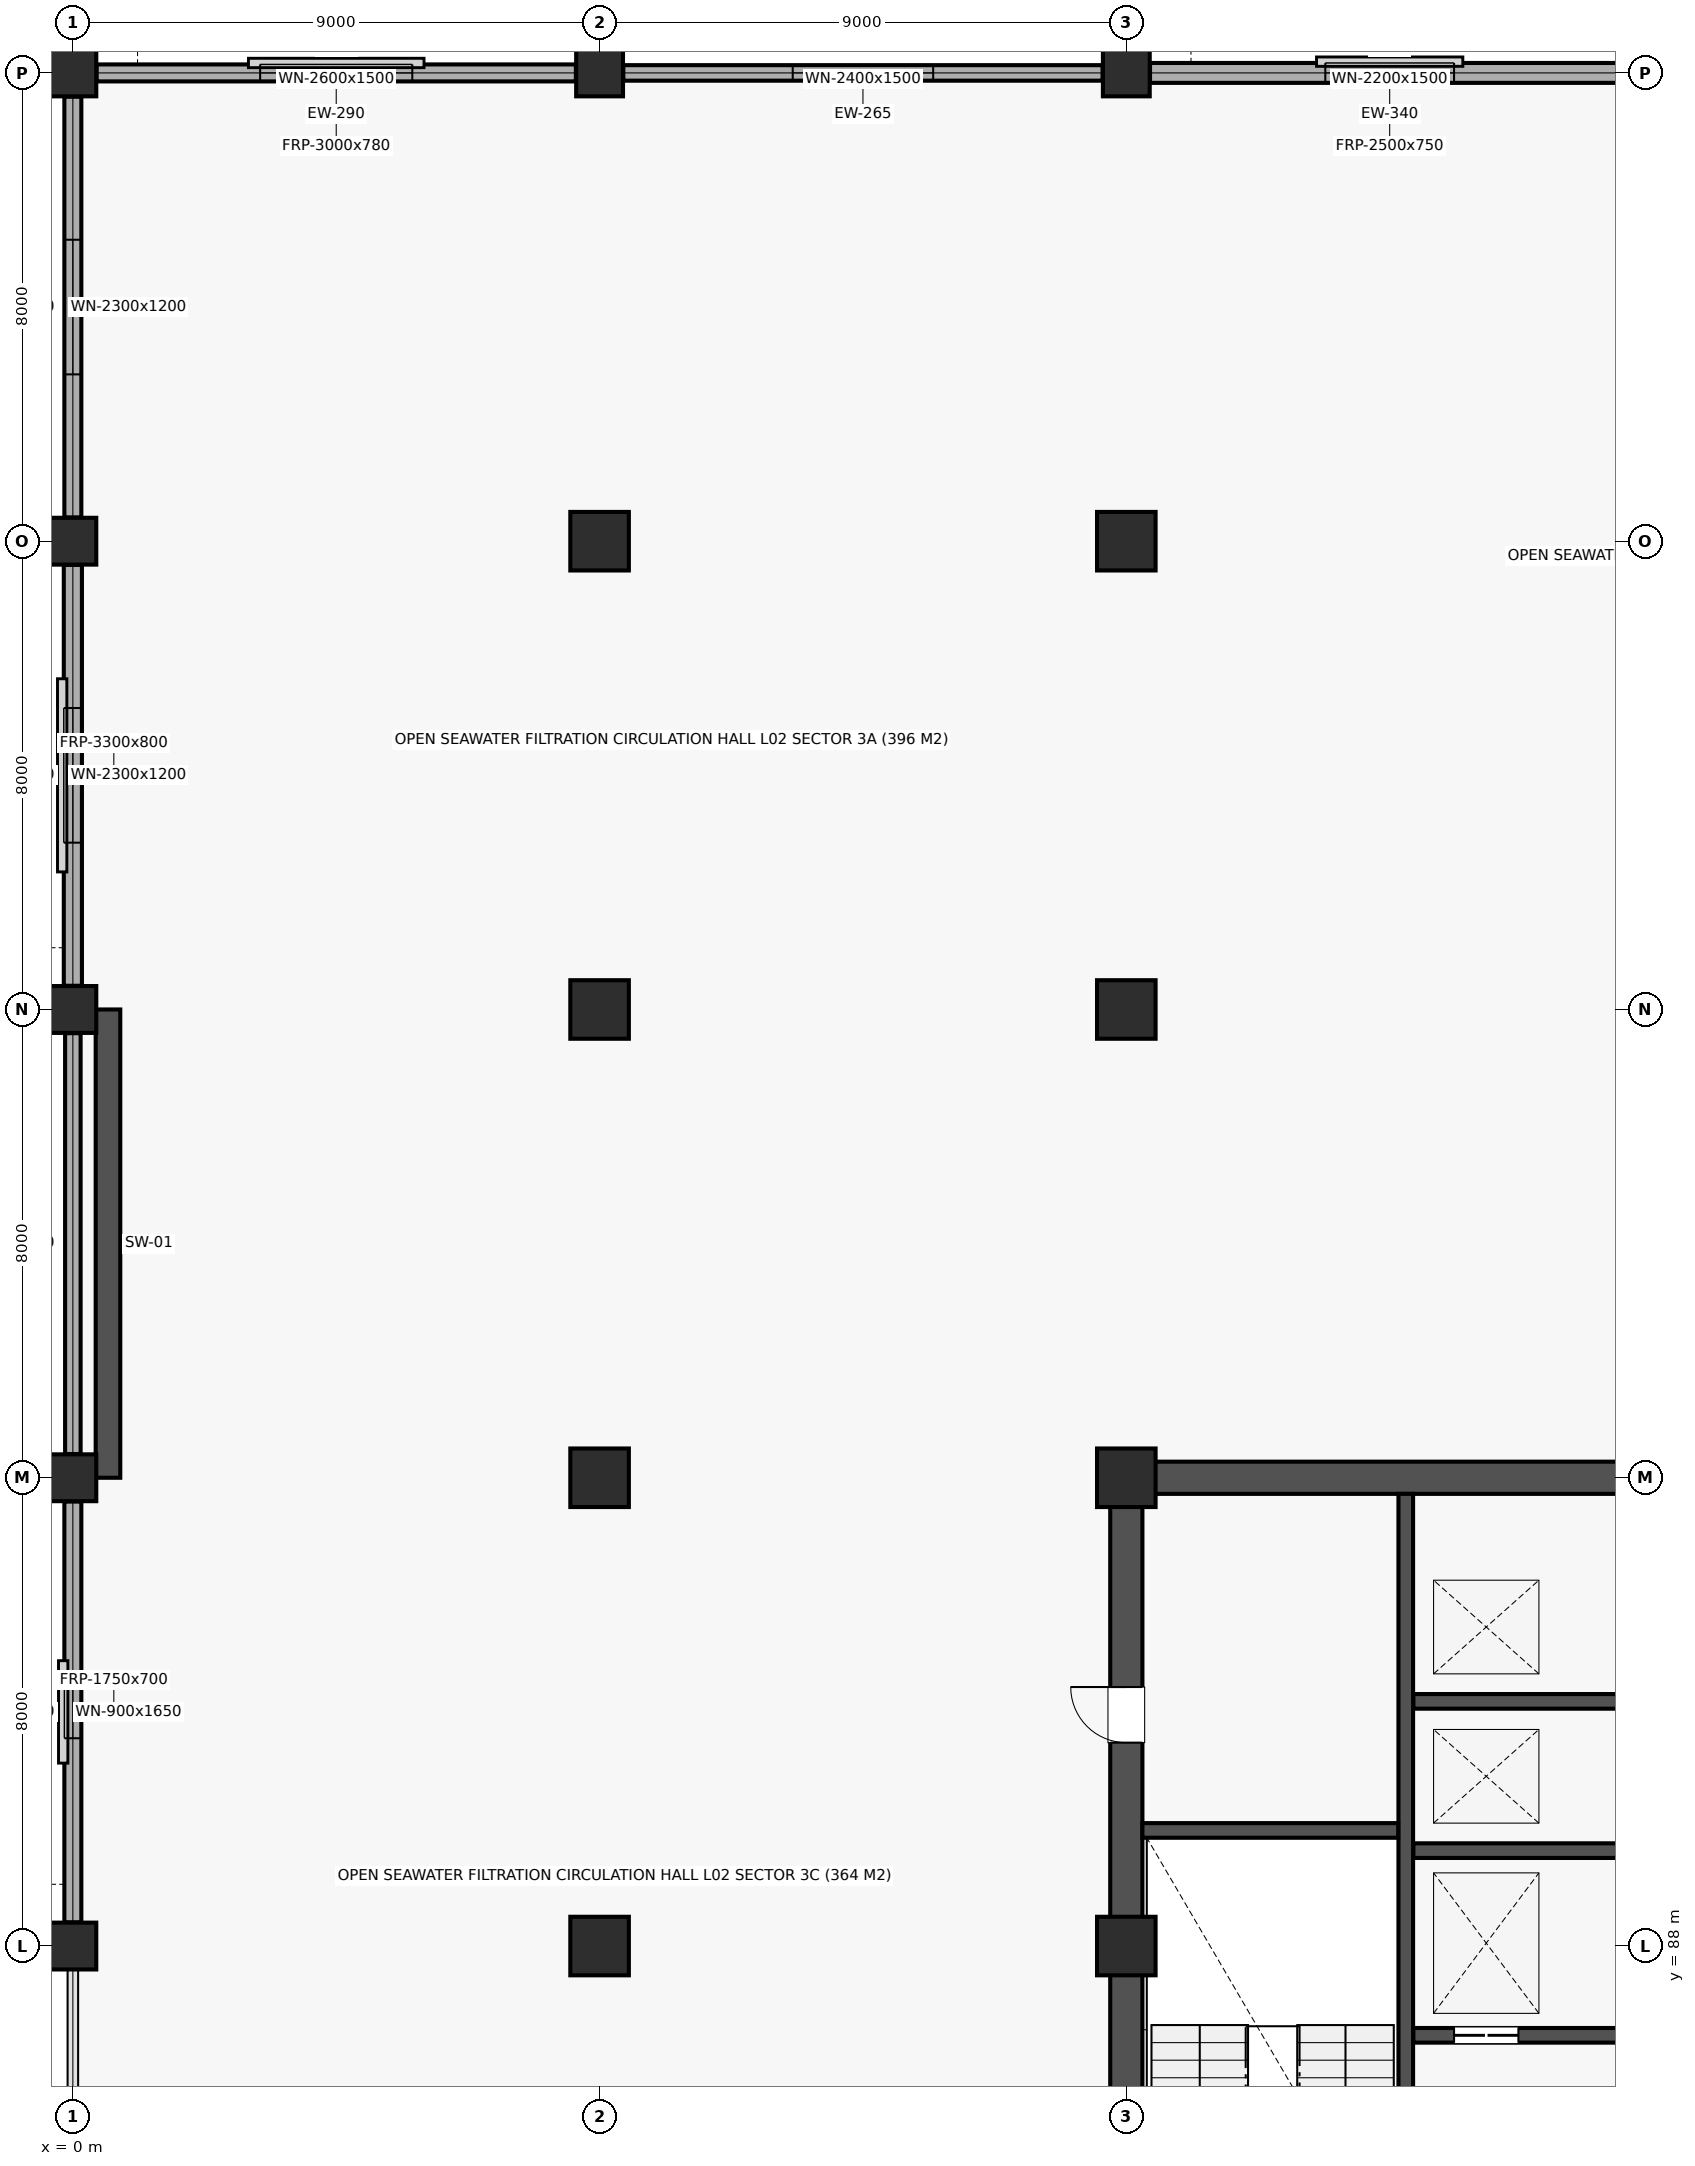
"""IFC4 building model, lengths in metres.
Left out: names, types, materials, properties, quantities, classifications, styles, units other than length and angle.
Written with IfcOpenShell. Run it as: python <this file> out.ifc"""

import sys

from ifc_helpers import new_model, si_unit, direction, frame, frame_2d, origin, origin_2d, place, context, subcontext, project, spatial, rectangle, extrude, element, fill, save


model = new_model("IFC4")
c1 = context("Model", 3, precision=1e-05, world=origin(), true_north=direction((0.0, 1.0)))
c2 = subcontext(c1, "Body", "Model", "MODEL_VIEW")
j1 = project(units=[si_unit("LENGTHUNIT", "METRE"), si_unit("PLANEANGLEUNIT", "RADIAN")], contexts=[c1])
p1 = place(None, origin())
s1 = spatial("IfcSite", under=j1, at=p1, CompositionType="ELEMENT")
p2 = place(p1, origin())
s2 = spatial("IfcBuilding", under=s1, at=p2, CompositionType="ELEMENT")
p3 = place(p2, frame((0.0, 0.0, 9.0)))
s3 = spatial("IfcBuildingStorey", under=s2, at=p3, CompositionType="ELEMENT", Elevation=9.0)
for number, where, z_axis, x_axis in (
    (1, (0.0, 88.0, 0.0), (0.0, 0.0, 1.0), (1.0, 0.0, 0.0)),
    (2, (0.0, 96.0, 0.0), (0.0, 0.0, 1.0), (1.0, 0.0, 0.0)),
    (3, (0.0, 104.0, 0.0), (0.0, 0.0, 1.0), (1.0, 0.0, 0.0)),
    (4, (0.0, 112.0, 0.0), (0.0, 0.0, 1.0), (1.0, 0.0, 0.0)),
    (5, (0.0, 120.0, 0.0), (0.0, 0.0, 1.0), (1.0, 0.0, 0.0)),
):
    element("IfcColumn", number, at=place(p3, frame(where, z_axis=z_axis, x_axis=x_axis)), inside=s3, PredefinedType="COLUMN", context=c2, shape_type="SweptSolid", body=[
        extrude(rectangle(XDim=0.8, YDim=0.8, at=origin_2d()), origin(), (0.0, 0.0, 1.0), 4.5),
    ])
for number, where, z_axis, x_axis in (
    (6, (9.0, 88.0, 0.0), (0.0, 0.0, 1.0), (1.0, 0.0, 0.0)),
    (7, (9.0, 96.0, 0.0), (0.0, 0.0, 1.0), (1.0, 0.0, 0.0)),
    (8, (9.0, 104.0, 0.0), (0.0, 0.0, 1.0), (1.0, 0.0, 0.0)),
    (9, (9.0, 112.0, 0.0), (0.0, 0.0, 1.0), (1.0, 0.0, 0.0)),
):
    element("IfcColumn", number, at=place(p3, frame(where, z_axis=z_axis, x_axis=x_axis)), inside=s3, PredefinedType="COLUMN", context=c2, shape_type="SweptSolid", body=[
        extrude(rectangle(XDim=1.0, YDim=1.0, at=origin_2d()), origin(), (0.0, 0.0, 1.0), 4.5),
    ])
p4 = place(p3, frame((9.0, 120.0, 0.0), z_axis=(0.0, 0.0, 1.0), x_axis=(1.0, 0.0, 0.0)))
e10 = element("IfcColumn", 10, at=p4, inside=s3, PredefinedType="COLUMN", context=c2, shape_type="SweptSolid", body=[
    extrude(rectangle(XDim=0.8, YDim=0.8, at=origin_2d()), origin(), (0.0, 0.0, 1.0), 4.5),
])
for number, where, z_axis, x_axis in (
    (11, (18.0, 88.0, 0.0), (0.0, 0.0, 1.0), (1.0, 0.0, 0.0)),
    (12, (18.0, 96.0, 0.0), (0.0, 0.0, 1.0), (1.0, 0.0, 0.0)),
    (13, (18.0, 104.0, 0.0), (0.0, 0.0, 1.0), (1.0, 0.0, 0.0)),
    (14, (18.0, 112.0, 0.0), (0.0, 0.0, 1.0), (1.0, 0.0, 0.0)),
):
    element("IfcColumn", number, at=place(p3, frame(where, z_axis=z_axis, x_axis=x_axis)), inside=s3, PredefinedType="COLUMN", context=c2, shape_type="SweptSolid", body=[
        extrude(rectangle(XDim=1.0, YDim=1.0, at=origin_2d()), origin(), (0.0, 0.0, 1.0), 4.5),
    ])
p5 = place(p3, frame((18.0, 120.0, 0.0), z_axis=(0.0, 0.0, 1.0), x_axis=(1.0, 0.0, 0.0)))
e15 = element("IfcColumn", 15, at=p5, inside=s3, PredefinedType="COLUMN", context=c2, shape_type="SweptSolid", body=[
    extrude(rectangle(XDim=0.8, YDim=0.8, at=origin_2d()), origin(), (0.0, 0.0, 1.0), 4.5),
])
p6 = place(p3, frame((0.6, 96.0, 0.0), z_axis=(0.0, 0.0, 1.0), x_axis=(0.0, 1.0, 0.0)))
e16 = element("IfcWall", 16, at=p6, inside=s3, PredefinedType="SHEAR", context=c2, shape_type="SweptSolid", body=[
    extrude(rectangle(XDim=8.0, YDim=0.42, at=frame_2d((4.0, 0.0))), origin(), (0.0, 0.0, 1.0), 4.14),
])
p7 = place(p3, frame((18.275, 96.0, 0.0), z_axis=(0.0, 0.0, 1.0), x_axis=(1.0, 0.0, 0.0)))
e17 = element("IfcWall", 17, at=p7, inside=s3, PredefinedType="SHEAR", context=c2, shape_type="SweptSolid", body=[
    extrude(rectangle(XDim=8.45, YDim=0.55, at=frame_2d((4.225, 0.0))), origin(), (0.0, 0.0, 1.0), 4.14),
])
p8 = place(p3, frame((18.0, 80.275, 0.0), z_axis=(0.0, 0.0, 1.0), x_axis=(0.0, 1.0, 0.0)))
e18 = element("IfcWall", 18, at=p8, inside=s3, PredefinedType="SHEAR", context=c2, shape_type="SweptSolid", body=[
    extrude(rectangle(XDim=15.45, YDim=0.55, at=frame_2d((7.725, 0.0))), origin(), (0.0, 0.0, 1.0), 4.14),
])
p9 = place(p8, frame((11.2, 0.0, 0.0)))
e19 = element("IfcOpeningElement", 19, at=p9, cuts=e18, PredefinedType="OPENING", context=c2, shape_type="SweptSolid", body=[
    extrude(rectangle(XDim=0.95, YDim=2.1, at=frame_2d((0.475, 1.05))), frame((0.0, 0.287, 0.0), z_axis=(0.0, -1.0, 0.0), x_axis=(1.0, 0.0, 0.0)), (0.0, 0.0, 1.0), 0.574),
])
p10 = place(p3, frame((22.775, 80.275, 0.0), z_axis=(0.0, 0.0, 1.0), x_axis=(0.0, 1.0, 0.0)))
e20 = element("IfcWall", 20, at=p10, inside=s3, PredefinedType="SOLIDWALL", context=c2, shape_type="SweptSolid", body=[
    extrude(rectangle(XDim=15.45, YDim=0.25, at=frame_2d((7.725, 0.0))), origin(), (0.0, 0.0, 1.0), 4.14),
])
p11 = place(p10, frame((0.45, 0.0, 0.0)))
e21 = element("IfcOpeningElement", 21, at=p11, cuts=e20, PredefinedType="OPENING", context=c2, shape_type="SweptSolid", body=[
    extrude(rectangle(XDim=1.1, YDim=2.15, at=frame_2d((0.55, 1.075))), frame((0.0, 0.137, 0.0), z_axis=(0.0, -1.0, 0.0), x_axis=(1.0, 0.0, 0.0)), (0.0, 0.0, 1.0), 0.274),
])
p12 = place(p3, frame((18.275, 89.975, 0.0), z_axis=(0.0, 0.0, 1.0), x_axis=(1.0, 0.0, 0.0)))
e22 = element("IfcWall", 22, at=p12, inside=s3, PredefinedType="SOLIDWALL", context=c2, shape_type="SweptSolid", body=[
    extrude(rectangle(XDim=4.37, YDim=0.25, at=frame_2d((2.185, 0.0))), origin(), (0.0, 0.0, 1.0), 4.14),
])
p13 = place(p3, frame((22.905, 86.475, 0.0), z_axis=(0.0, 0.0, 1.0), x_axis=(1.0, 0.0, 0.0)))
e23 = element("IfcWall", 23, at=p13, inside=s3, PredefinedType="SOLIDWALL", context=c2, shape_type="SweptSolid", body=[
    extrude(rectangle(XDim=3.82, YDim=0.25, at=frame_2d((1.91, 0.0))), origin(), (0.0, 0.0, 1.0), 4.14),
])
p14 = place(p13, frame((0.695, 0.0, 0.0)))
e24 = element("IfcOpeningElement", 24, at=p14, cuts=e23, PredefinedType="OPENING", context=c2, shape_type="SweptSolid", body=[
    extrude(rectangle(XDim=1.1, YDim=2.12, at=frame_2d((0.55, 1.06))), frame((0.0, 0.137, 0.0), z_axis=(0.0, -1.0, 0.0), x_axis=(1.0, 0.0, 0.0)), (0.0, 0.0, 1.0), 0.274),
])
for number, where, z_axis, x_axis in (
    (25, (22.905, 89.63, 0.0), (0.0, 0.0, 1.0), (1.0, 0.0, 0.0)),
    (26, (22.905, 92.18, 0.0), (0.0, 0.0, 1.0), (1.0, 0.0, 0.0)),
):
    element("IfcWall", number, at=place(p3, frame(where, z_axis=z_axis, x_axis=x_axis)), inside=s3, PredefinedType="SOLIDWALL", context=c2, shape_type="SweptSolid", body=[
        extrude(rectangle(XDim=3.82, YDim=0.25, at=frame_2d((1.91, 0.0))), origin(), (0.0, 0.0, 1.0), 4.14),
    ])
p15 = place(p3, frame((0.405, 120.0, 0.0), z_axis=(0.0, 0.0, 1.0), x_axis=(1.0, 0.0, 0.0)))
e27 = element("IfcWall", 27, at=p15, inside=s3, PredefinedType="STANDARD", context=c2, shape_type="SweptSolid", body=[
    extrude(rectangle(XDim=8.19, YDim=0.29, at=frame_2d((4.095, 0.0))), origin(), (0.0, 0.0, 1.0), 3.42),
])
p16 = place(p15, frame((2.795, 0.0, 0.85)))
e28 = element("IfcOpeningElement", 28, at=p16, cuts=e27, PredefinedType="OPENING", context=c2, shape_type="SweptSolid", body=[
    extrude(rectangle(XDim=2.6, YDim=1.5, at=frame_2d((1.3, 0.75))), frame((0.0, 0.157, 0.0), z_axis=(0.0, -1.0, 0.0), x_axis=(1.0, 0.0, 0.0)), (0.0, 0.0, 1.0), 0.314),
])
p17 = place(p3, frame((9.405, 120.0, 0.0), z_axis=(0.0, 0.0, 1.0), x_axis=(1.0, 0.0, 0.0)))
e29 = element("IfcWall", 29, at=p17, inside=s3, PredefinedType="STANDARD", context=c2, shape_type="SweptSolid", body=[
    extrude(rectangle(XDim=8.19, YDim=0.265, at=frame_2d((4.095, 0.0))), origin(), (0.0, 0.0, 1.0), 3.42),
])
p18 = place(p17, frame((2.895, 0.0, 0.85)))
e30 = element("IfcOpeningElement", 30, at=p18, cuts=e29, PredefinedType="OPENING", context=c2, shape_type="SweptSolid", body=[
    extrude(rectangle(XDim=2.4, YDim=1.5, at=frame_2d((1.2, 0.75))), frame((0.0, 0.145, 0.0), z_axis=(0.0, -1.0, 0.0), x_axis=(1.0, 0.0, 0.0)), (0.0, 0.0, 1.0), 0.289),
])
p19 = place(p3, frame((18.405, 120.0, 0.0), z_axis=(0.0, 0.0, 1.0), x_axis=(1.0, 0.0, 0.0)))
e31 = element("IfcWall", 31, at=p19, inside=s3, PredefinedType="STANDARD", context=c2, shape_type="SweptSolid", body=[
    extrude(rectangle(XDim=8.19, YDim=0.34, at=frame_2d((4.095, 0.0))), origin(), (0.0, 0.0, 1.0), 3.42),
])
p20 = place(p19, frame((2.995, 0.0, 0.85)))
e32 = element("IfcOpeningElement", 32, at=p20, cuts=e31, PredefinedType="OPENING", context=c2, shape_type="SweptSolid", body=[
    extrude(rectangle(XDim=2.2, YDim=1.5, at=frame_2d((1.1, 0.75))), frame((0.0, 0.182, 0.0), z_axis=(0.0, -1.0, 0.0), x_axis=(1.0, 0.0, 0.0)), (0.0, 0.0, 1.0), 0.364),
])
p21 = place(p3, frame((0.0, 88.405, 0.0), z_axis=(0.0, 0.0, 1.0), x_axis=(0.0, 1.0, 0.0)))
e33 = element("IfcWall", 33, at=p21, inside=s3, PredefinedType="STANDARD", context=c2, shape_type="SweptSolid", body=[
    extrude(rectangle(XDim=7.19, YDim=0.29, at=frame_2d((3.595, 0.0))), origin(), (0.0, 0.0, 1.0), 3.42),
])
p22 = place(p21, frame((3.145, 0.0, 0.85)))
e34 = element("IfcOpeningElement", 34, at=p22, cuts=e33, PredefinedType="OPENING", context=c2, shape_type="SweptSolid", body=[
    extrude(rectangle(XDim=0.9, YDim=1.65, at=frame_2d((0.45, 0.825))), frame((0.0, 0.157, 0.0), z_axis=(0.0, -1.0, 0.0), x_axis=(1.0, 0.0, 0.0)), (0.0, 0.0, 1.0), 0.314),
])
p23 = place(p3, frame((0.0, 96.405, 0.0), z_axis=(0.0, 0.0, 1.0), x_axis=(0.0, 1.0, 0.0)))
e35 = element("IfcWall", 35, at=p23, inside=s3, PredefinedType="STANDARD", context=c2, shape_type="SweptSolid", body=[
    extrude(rectangle(XDim=7.19, YDim=0.265, at=frame_2d((3.595, 0.0))), origin(), (0.0, 0.0, 1.0), 3.42),
])
p24 = place(p3, frame((0.0, 104.405, 0.0), z_axis=(0.0, 0.0, 1.0), x_axis=(0.0, 1.0, 0.0)))
e36 = element("IfcWall", 36, at=p24, inside=s3, PredefinedType="STANDARD", context=c2, shape_type="SweptSolid", body=[
    extrude(rectangle(XDim=7.19, YDim=0.31, at=frame_2d((3.595, 0.0))), origin(), (0.0, 0.0, 1.0), 3.42),
])
p25 = place(p24, frame((2.445, 0.0, 0.85)))
e37 = element("IfcOpeningElement", 37, at=p25, cuts=e36, PredefinedType="OPENING", context=c2, shape_type="SweptSolid", body=[
    extrude(rectangle(XDim=2.3, YDim=1.2, at=frame_2d((1.15, 0.6))), frame((0.0, 0.167, 0.0), z_axis=(0.0, -1.0, 0.0), x_axis=(1.0, 0.0, 0.0)), (0.0, 0.0, 1.0), 0.334),
])
p26 = place(p3, frame((0.0, 112.405, 0.0), z_axis=(0.0, 0.0, 1.0), x_axis=(0.0, 1.0, 0.0)))
e38 = element("IfcWall", 38, at=p26, inside=s3, PredefinedType="STANDARD", context=c2, shape_type="SweptSolid", body=[
    extrude(rectangle(XDim=7.19, YDim=0.29, at=frame_2d((3.595, 0.0))), origin(), (0.0, 0.0, 1.0), 3.42),
])
p27 = place(p26, frame((2.445, 0.0, 0.85)))
e39 = element("IfcOpeningElement", 39, at=p27, cuts=e38, PredefinedType="OPENING", context=c2, shape_type="SweptSolid", body=[
    extrude(rectangle(XDim=2.3, YDim=1.2, at=frame_2d((1.15, 0.6))), frame((0.0, 0.157, 0.0), z_axis=(0.0, -1.0, 0.0), x_axis=(1.0, 0.0, 0.0)), (0.0, 0.0, 1.0), 0.314),
])
p28 = place(p9, origin())
e40 = element("IfcDoor", 40, at=p28, inside=s3, OperationType="SINGLE_SWING_RIGHT", PredefinedType="DOOR", context=c2, shape_type="SweptSolid", body=[
    extrude(rectangle(XDim=0.95, YDim=2.1, at=frame_2d((0.475, 1.05))), frame((0.0, 0.025, 0.0), z_axis=(0.0, -1.0, 0.0), x_axis=(1.0, 0.0, 0.0)), (0.0, 0.0, 1.0), 0.05),
])
fill(e19, e40)
p29 = place(p14, origin())
e41 = element("IfcDoor", 41, at=p29, inside=s3, OperationType="DOUBLE_DOOR_SLIDING", PredefinedType="DOOR", context=c2, shape_type="SweptSolid", body=[
    extrude(rectangle(XDim=1.1, YDim=2.12, at=frame_2d((0.55, 1.06))), frame((0.0, 0.025, 0.0), z_axis=(0.0, -1.0, 0.0), x_axis=(1.0, 0.0, 0.0)), (0.0, 0.0, 1.0), 0.05),
])
fill(e24, e41)
p30 = place(p16, origin())
e42 = element("IfcWindow", 42, at=p30, inside=s3, PartitioningType="SINGLE_PANEL", PredefinedType="WINDOW", context=c2, shape_type="SweptSolid", body=[
    extrude(rectangle(XDim=2.6, YDim=1.5, at=frame_2d((1.3, 0.75))), frame((0.0, 0.03, 0.0), z_axis=(0.0, -1.0, 0.0), x_axis=(1.0, 0.0, 0.0)), (0.0, 0.0, 1.0), 0.06),
])
fill(e28, e42)
p31 = place(p18, origin())
e43 = element("IfcWindow", 43, at=p31, inside=s3, PartitioningType="SINGLE_PANEL", PredefinedType="WINDOW", context=c2, shape_type="SweptSolid", body=[
    extrude(rectangle(XDim=2.4, YDim=1.5, at=frame_2d((1.2, 0.75))), frame((0.0, 0.03, 0.0), z_axis=(0.0, -1.0, 0.0), x_axis=(1.0, 0.0, 0.0)), (0.0, 0.0, 1.0), 0.06),
])
fill(e30, e43)
p32 = place(p20, origin())
e44 = element("IfcWindow", 44, at=p32, inside=s3, PartitioningType="SINGLE_PANEL", PredefinedType="WINDOW", context=c2, shape_type="SweptSolid", body=[
    extrude(rectangle(XDim=2.2, YDim=1.5, at=frame_2d((1.1, 0.75))), frame((0.0, 0.03, 0.0), z_axis=(0.0, -1.0, 0.0), x_axis=(1.0, 0.0, 0.0)), (0.0, 0.0, 1.0), 0.06),
])
fill(e32, e44)
p33 = place(p22, origin())
e45 = element("IfcWindow", 45, at=p33, inside=s3, PartitioningType="SINGLE_PANEL", PredefinedType="WINDOW", context=c2, shape_type="SweptSolid", body=[
    extrude(rectangle(XDim=0.9, YDim=1.65, at=frame_2d((0.45, 0.825))), frame((0.0, 0.03, 0.0), z_axis=(0.0, -1.0, 0.0), x_axis=(1.0, 0.0, 0.0)), (0.0, 0.0, 1.0), 0.06),
])
fill(e34, e45)
p34 = place(p25, origin())
e46 = element("IfcWindow", 46, at=p34, inside=s3, PartitioningType="SINGLE_PANEL", PredefinedType="WINDOW", context=c2, shape_type="SweptSolid", body=[
    extrude(rectangle(XDim=2.3, YDim=1.2, at=frame_2d((1.15, 0.6))), frame((0.0, 0.03, 0.0), z_axis=(0.0, -1.0, 0.0), x_axis=(1.0, 0.0, 0.0)), (0.0, 0.0, 1.0), 0.06),
])
fill(e37, e46)
p35 = place(p27, origin())
e47 = element("IfcWindow", 47, at=p35, inside=s3, PartitioningType="SINGLE_PANEL", PredefinedType="WINDOW", context=c2, shape_type="SweptSolid", body=[
    extrude(rectangle(XDim=2.3, YDim=1.2, at=frame_2d((1.15, 0.6))), frame((0.0, 0.03, 0.0), z_axis=(0.0, -1.0, 0.0), x_axis=(1.0, 0.0, 0.0)), (0.0, 0.0, 1.0), 0.06),
])
fill(e39, e47)
save(model, sys.argv[1])
